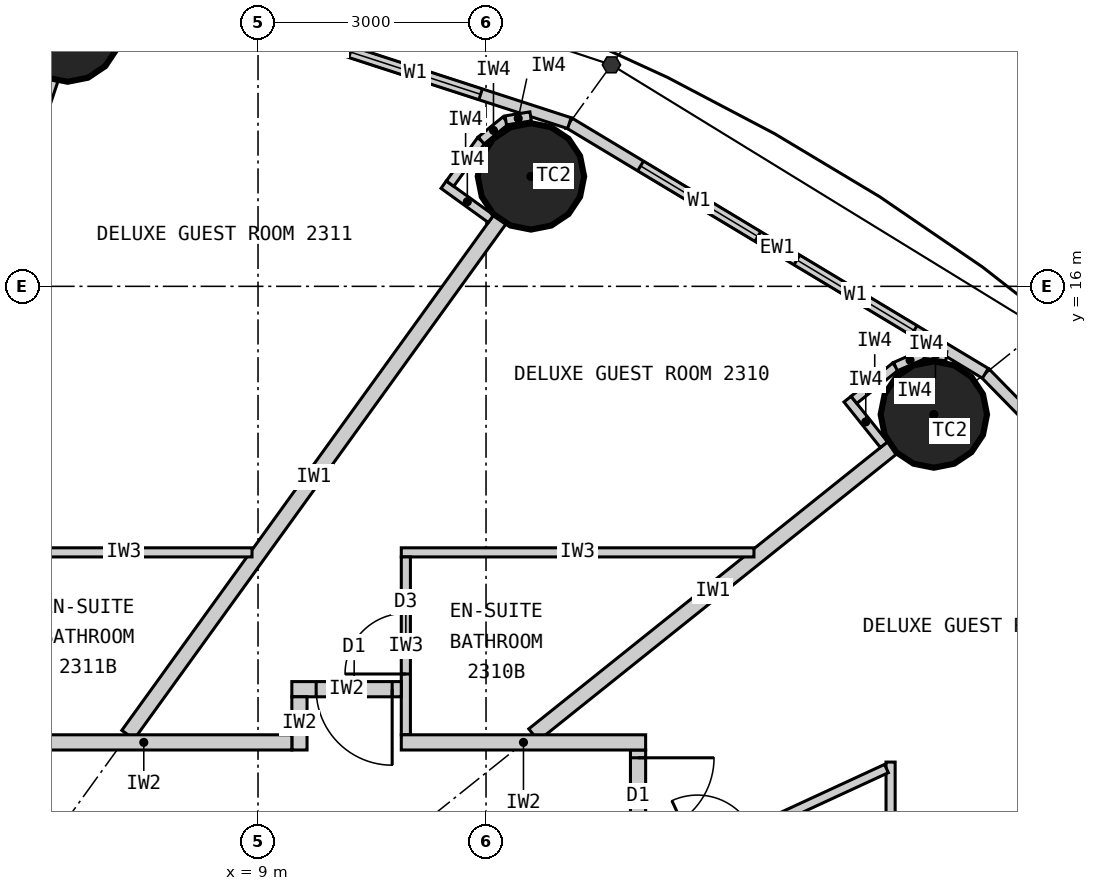
"""IFC4 building model, lengths in metres.
Left out: names, types, materials, properties, quantities, classifications, styles, units other than length and angle.
Written with IfcOpenShell. Run it as: python <this file> out.ifc"""

import sys

from ifc_helpers import new_model, si_unit, direction, frame, frame_2d, origin, origin_2d, place, context, subcontext, project, spatial, rectangle, circle, extrude, clip, halfspace, element, fill, save


model = new_model("IFC4")
c1 = context("Model", 3, precision=1e-05, world=origin(), true_north=direction((0.0, 1.0)))
c2 = subcontext(c1, "Body", "Model", "MODEL_VIEW")
j1 = project(units=[si_unit("LENGTHUNIT", "METRE"), si_unit("PLANEANGLEUNIT", "RADIAN")], contexts=[c1])
p1 = place(None, origin())
s1 = spatial("IfcSite", under=j1, at=p1, CompositionType="ELEMENT")
p2 = place(p1, origin())
s2 = spatial("IfcBuilding", under=s1, at=p2, CompositionType="ELEMENT")
p3 = place(p2, frame((0.0, 0.0, 90.3)))
s3 = spatial("IfcBuildingStorey", under=s2, at=p3, CompositionType="ELEMENT", Elevation=90.3)
for number, where, z_axis, x_axis in (
    (1, (17.892, 14.313, 0.0), (0.0, 0.0, 1.0), (1.0, 0.0, 0.0)),
    (2, (12.591, 17.447, 0.0), (0.0, 0.0, 1.0), (1.0, 0.0, 0.0)),
    (3, (6.495, 19.391, 0.0), (0.0, 0.0, 1.0), (1.0, 0.0, 0.0)),
):
    element("IfcColumn", number, at=place(p3, frame(where, z_axis=z_axis, x_axis=x_axis)), inside=s3, PredefinedType="COLUMN", context=c2, shape_type="Clipping", body=[
        clip(extrude(circle(Radius=0.7, at=origin_2d()), origin(), (0.0, 0.0, 1.0), 3.3), halfspace(frame((0.0, 0.0, 2.25), z_axis=(0.0, 0.0, 1.0), x_axis=(1.0, 0.0, 0.0)), False)),
    ])
p4 = place(p3, frame((22.803, 10.532, 0.0), z_axis=(0.0, 0.0, 1.0), x_axis=(-0.699602905915, 0.714531856557, 0.0)))
e4 = element("IfcWall", 4, at=p4, inside=s3, PredefinedType="ELEMENTEDWALL", context=c2, shape_type="SweptSolid", body=[
    extrude(rectangle(XDim=6.051, YDim=0.15, at=frame_2d((3.025, 0.0))), origin(), (0.0, 0.0, 1.0), 3.05),
])
p5 = place(p4, frame((0.926, 0.0, 0.9)))
e5 = element("IfcOpeningElement", 5, at=p5, cuts=e4, PredefinedType="OPENING", context=c2, shape_type="SweptSolid", body=[
    extrude(rectangle(XDim=1.8, YDim=1.9, at=frame_2d((0.9, 0.95))), frame((0.0, 0.085, 0.0), z_axis=(0.0, -1.0, 0.0), x_axis=(1.0, 0.0, 0.0)), (0.0, 0.0, 1.0), 0.17),
])
p6 = place(p4, frame((3.325, 0.0, 0.9)))
e6 = element("IfcOpeningElement", 6, at=p6, cuts=e4, PredefinedType="OPENING", context=c2, shape_type="SweptSolid", body=[
    extrude(rectangle(XDim=1.8, YDim=1.9, at=frame_2d((0.9, 0.95))), frame((0.0, 0.085, 0.0), z_axis=(0.0, -1.0, 0.0), x_axis=(1.0, 0.0, 0.0)), (0.0, 0.0, 1.0), 0.17),
])
p7 = place(p3, frame((18.57, 14.856, 0.0), z_axis=(0.0, 0.0, 1.0), x_axis=(-0.856983180864, 0.515344377787, 0.0)))
e7 = element("IfcWall", 7, at=p7, inside=s3, PredefinedType="ELEMENTEDWALL", context=c2, shape_type="SweptSolid", body=[
    extrude(rectangle(XDim=6.386, YDim=0.15, at=frame_2d((3.193, 0.0))), origin(), (0.0, 0.0, 1.0), 3.05),
])
p8 = place(p7, frame((1.093, 0.0, 0.9)))
e8 = element("IfcOpeningElement", 8, at=p8, cuts=e7, PredefinedType="OPENING", context=c2, shape_type="SweptSolid", body=[
    extrude(rectangle(XDim=1.8, YDim=1.9, at=frame_2d((0.9, 0.95))), frame((0.0, 0.085, 0.0), z_axis=(0.0, -1.0, 0.0), x_axis=(1.0, 0.0, 0.0)), (0.0, 0.0, 1.0), 0.17),
])
p9 = place(p7, frame((3.493, 0.0, 0.9)))
e9 = element("IfcOpeningElement", 9, at=p9, cuts=e7, PredefinedType="OPENING", context=c2, shape_type="SweptSolid", body=[
    extrude(rectangle(XDim=1.8, YDim=1.9, at=frame_2d((0.9, 0.95))), frame((0.0, 0.085, 0.0), z_axis=(0.0, -1.0, 0.0), x_axis=(1.0, 0.0, 0.0)), (0.0, 0.0, 1.0), 0.17),
])
p10 = place(p3, frame((13.096, 18.147, 0.0), z_axis=(0.0, 0.0, 1.0), x_axis=(-0.951137534625, 0.308767534285, 0.0)))
e10 = element("IfcWall", 10, at=p10, inside=s3, PredefinedType="ELEMENTEDWALL", context=c2, shape_type="SweptSolid", body=[
    extrude(rectangle(XDim=6.655, YDim=0.15, at=frame_2d((3.328, 0.0))), origin(), (0.0, 0.0, 1.0), 3.05),
])
p11 = place(p10, frame((1.228, 0.0, 0.9)))
e11 = element("IfcOpeningElement", 11, at=p11, cuts=e10, PredefinedType="OPENING", context=c2, shape_type="SweptSolid", body=[
    extrude(rectangle(XDim=1.8, YDim=1.9, at=frame_2d((0.9, 0.95))), frame((0.0, 0.085, 0.0), z_axis=(0.0, -1.0, 0.0), x_axis=(1.0, 0.0, 0.0)), (0.0, 0.0, 1.0), 0.17),
])
p12 = place(p10, frame((3.628, 0.0, 0.9)))
e12 = element("IfcOpeningElement", 12, at=p12, cuts=e10, PredefinedType="OPENING", context=c2, shape_type="SweptSolid", body=[
    extrude(rectangle(XDim=1.8, YDim=1.9, at=frame_2d((0.9, 0.95))), frame((0.0, 0.085, 0.0), z_axis=(0.0, -1.0, 0.0), x_axis=(1.0, 0.0, 0.0)), (0.0, 0.0, 1.0), 0.17),
])
p13 = place(p3, frame((14.0, -9.9, 0.0), z_axis=(0.0, 0.0, 1.0), x_axis=(0.0, 1.0, 0.0)))
e13 = element("IfcWall", 13, at=p13, inside=s3, PredefinedType="PARTITIONING", context=c2, shape_type="SweptSolid", body=[
    extrude(rectangle(XDim=19.8, YDim=0.2, at=frame_2d((9.9, 0.0))), origin(), (0.0, 0.0, 1.0), 3.05),
])
p14 = place(p13, frame((0.204, 0.0, 0.0)))
e14 = element("IfcOpeningElement", 14, at=p14, cuts=e13, PredefinedType="OPENING", context=c2, shape_type="SweptSolid", body=[
    extrude(rectangle(XDim=1.0, YDim=2.2, at=frame_2d((0.5, 1.1))), frame((0.0, 0.11, 0.0), z_axis=(0.0, -1.0, 0.0), x_axis=(1.0, 0.0, 0.0)), (0.0, 0.0, 1.0), 0.22),
])
p15 = place(p13, frame((13.715, 0.0, 0.0)))
e15 = element("IfcOpeningElement", 15, at=p15, cuts=e13, PredefinedType="OPENING", context=c2, shape_type="SweptSolid", body=[
    extrude(rectangle(XDim=1.0, YDim=2.2, at=frame_2d((0.5, 1.1))), frame((0.0, 0.11, 0.0), z_axis=(0.0, -1.0, 0.0), x_axis=(1.0, 0.0, 0.0)), (0.0, 0.0, 1.0), 0.22),
])
p16 = place(p13, frame((18.698, 0.0, 0.0)))
e16 = element("IfcOpeningElement", 16, at=p16, cuts=e13, PredefinedType="OPENING", context=c2, shape_type="SweptSolid", body=[
    extrude(rectangle(XDim=1.0, YDim=2.2, at=frame_2d((0.5, 1.1))), frame((0.0, 0.11, 0.0), z_axis=(0.0, -1.0, 0.0), x_axis=(1.0, 0.0, 0.0)), (0.0, 0.0, 1.0), 0.22),
])
p17 = place(p3, frame((14.1, 6.512, 0.0), z_axis=(0.0, 0.0, 1.0), x_axis=(0.907832871056, 0.419332181247, 0.0)))
e17 = element("IfcWall", 17, at=p17, inside=s3, PredefinedType="PARTITIONING", context=c2, shape_type="SweptSolid", body=[
    extrude(rectangle(XDim=8.023, YDim=0.2, at=frame_2d((4.011, 0.0))), origin(), (0.0, 0.0, 1.0), 2.15),
])
p18 = place(p3, frame((12.625, 10.1, 0.0), z_axis=(0.0, 0.0, 1.0), x_axis=(0.780892451574, 0.624665493744, 0.0)))
e18 = element("IfcWall", 18, at=p18, inside=s3, PredefinedType="PARTITIONING", context=c2, shape_type="SweptSolid", body=[
    extrude(rectangle(XDim=6.045, YDim=0.2, at=frame_2d((3.022, 0.0))), origin(), (0.0, 0.0, 1.0), 2.25),
])
p19 = place(p3, frame((7.289, 10.1, 0.0), z_axis=(0.0, 0.0, 1.0), x_axis=(0.585198353053, 0.810890182197, 0.0)))
e19 = element("IfcWall", 19, at=p19, inside=s3, PredefinedType="PARTITIONING", context=c2, shape_type="SweptSolid", body=[
    extrude(rectangle(XDim=8.36, YDim=0.2, at=frame_2d((4.18, 0.0))), origin(), (0.0, 0.0, 1.0), 2.15),
])
p20 = place(p3, frame((3.383, 10.1, 0.0), z_axis=(0.0, 0.0, 1.0), x_axis=(0.31759592231, 0.948226149256, 0.0)))
e20 = element("IfcWall", 20, at=p20, inside=s3, PredefinedType="PARTITIONING", context=c2, shape_type="SweptSolid", body=[
    extrude(rectangle(XDim=9.098, YDim=0.2, at=frame_2d((4.549, 0.0))), origin(), (0.0, 0.0, 1.0), 2.15),
])
p21 = place(p3, frame((17.323, 8.101, 0.0), z_axis=(0.0, 0.0, 1.0), x_axis=(0.0, 1.0, 0.0)))
e21 = element("IfcWall", 21, at=p21, inside=s3, PredefinedType="PARTITIONING", context=c2, shape_type="SweptSolid", body=[
    extrude(rectangle(XDim=1.64, YDim=0.12, at=frame_2d((0.82, 0.0))), origin(), (0.0, 0.0, 1.0), 3.05),
])
p22 = place(p3, frame((14.1, 8.193, 0.0), z_axis=(0.0, 0.0, 1.0), x_axis=(0.907836493557, 0.419324338628, 0.0)))
e22 = element("IfcWall", 22, at=p22, inside=s3, PredefinedType="PARTITIONING", context=c2, shape_type="SweptSolid", body=[
    extrude(rectangle(XDim=3.49, YDim=0.12, at=frame_2d((1.745, 0.0))), origin(), (0.0, 0.0, 1.0), 3.05),
])
p23 = place(p22, frame((0.75, 0.0, 0.0)))
e23 = element("IfcOpeningElement", 23, at=p23, cuts=e22, PredefinedType="OPENING", context=c2, shape_type="SweptSolid", body=[
    extrude(rectangle(XDim=0.8, YDim=2.1, at=frame_2d((0.4, 1.05))), frame((0.0, 0.07, 0.0), z_axis=(0.0, -1.0, 0.0), x_axis=(1.0, 0.0, 0.0)), (0.0, 0.0, 1.0), 0.14),
])
p24 = place(p3, frame((15.525, 12.5, 0.0), z_axis=(0.0, 0.0, 1.0), x_axis=(-1.0, 0.0, 0.0)))
e24 = element("IfcWall", 24, at=p24, inside=s3, PredefinedType="PARTITIONING", context=c2, shape_type="SweptSolid", body=[
    extrude(rectangle(XDim=4.64, YDim=0.12, at=frame_2d((2.32, 0.0))), origin(), (0.0, 0.0, 1.0), 3.05),
])
p25 = place(p3, frame((10.945, 10.1, 0.0), z_axis=(0.0, 0.0, 1.0), x_axis=(0.0, 1.0, 0.0)))
e25 = element("IfcWall", 25, at=p25, inside=s3, PredefinedType="PARTITIONING", context=c2, shape_type="SweptSolid", body=[
    extrude(rectangle(XDim=2.34, YDim=0.12, at=frame_2d((1.17, 0.0))), origin(), (0.0, 0.0, 1.0), 3.05),
])
p26 = place(p25, frame((0.8, 0.0, 0.0)))
e26 = element("IfcOpeningElement", 26, at=p26, cuts=e25, PredefinedType="OPENING", context=c2, shape_type="SweptSolid", body=[
    extrude(rectangle(XDim=0.8, YDim=2.1, at=frame_2d((0.4, 1.05))), frame((0.0, 0.07, 0.0), z_axis=(0.0, -1.0, 0.0), x_axis=(1.0, 0.0, 0.0)), (0.0, 0.0, 1.0), 0.14),
])
p27 = place(p3, frame((8.921, 12.5, 0.0), z_axis=(0.0, 0.0, 1.0), x_axis=(-1.0, 0.0, 0.0)))
e27 = element("IfcWall", 27, at=p27, inside=s3, PredefinedType="PARTITIONING", context=c2, shape_type="SweptSolid", body=[
    extrude(rectangle(XDim=3.372, YDim=0.12, at=frame_2d((1.686, 0.0))), origin(), (0.0, 0.0, 1.0), 3.05),
])
p28 = place(p3, frame((9.445, 10.7, 0.0), z_axis=(0.0, 0.0, 1.0), x_axis=(1.0, 0.0, 0.0)))
e28 = element("IfcWall", 28, at=p28, inside=s3, PredefinedType="PARTITIONING", context=c2, shape_type="SweptSolid", body=[
    extrude(rectangle(XDim=1.44, YDim=0.2, at=frame_2d((0.72, 0.0))), origin(), (0.0, 0.0, 1.0), 3.05),
])
p29 = place(p28, frame((0.32, 0.0, 0.0)))
e29 = element("IfcOpeningElement", 29, at=p29, cuts=e28, PredefinedType="OPENING", context=c2, shape_type="SweptSolid", body=[
    extrude(rectangle(XDim=1.0, YDim=2.2, at=frame_2d((0.5, 1.1))), frame((0.0, 0.11, 0.0), z_axis=(0.0, -1.0, 0.0), x_axis=(1.0, 0.0, 0.0)), (0.0, 0.0, 1.0), 0.22),
])
p30 = place(p3, frame((9.545, 9.9, 0.0), z_axis=(0.0, 0.0, 1.0), x_axis=(0.0, 1.0, 0.0)))
e30 = element("IfcWall", 30, at=p30, inside=s3, PredefinedType="PARTITIONING", context=c2, shape_type="SweptSolid", body=[
    extrude(rectangle(XDim=0.7, YDim=0.2, at=frame_2d((0.35, 0.0))), origin(), (0.0, 0.0, 1.0), 3.05),
])
p31 = place(p3, frame((5.549, 10.0, 0.0), z_axis=(0.0, 0.0, 1.0), x_axis=(1.0, 0.0, 0.0)))
e31 = element("IfcWall", 31, at=p31, inside=s3, PredefinedType="PARTITIONING", context=c2, shape_type="SweptSolid", body=[
    extrude(rectangle(XDim=3.896, YDim=0.2, at=frame_2d((1.948, 0.0))), origin(), (0.0, 0.0, 1.0), 3.05),
])
p32 = place(p3, frame((10.885, 10.0, 0.0), z_axis=(0.0, 0.0, 1.0), x_axis=(1.0, 0.0, 0.0)))
e32 = element("IfcWall", 32, at=p32, inside=s3, PredefinedType="PARTITIONING", context=c2, shape_type="SweptSolid", body=[
    extrude(rectangle(XDim=3.215, YDim=0.2, at=frame_2d((1.607, 0.0))), origin(), (0.0, 0.0, 1.0), 3.05),
])
p33 = place(p3, frame((17.236, 13.917, 0.0), z_axis=(0.0, 0.0, 1.0), x_axis=(-0.624695047554, 0.780868809443, 0.0)))
e33 = element("IfcWall", 33, at=p33, inside=s3, PredefinedType="PARTITIONING", context=c2, shape_type="SweptSolid", body=[
    extrude(rectangle(XDim=0.768, YDim=0.12, at=frame_2d((0.384, 0.0))), origin(), (0.0, 0.0, 1.0), 3.05),
])
p34 = place(p3, frame((16.841, 14.507, 0.0), z_axis=(0.0, 0.0, 1.0), x_axis=(0.780902834923, 0.62465251333, 0.0)))
e34 = element("IfcWall", 34, at=p34, inside=s3, PredefinedType="PARTITIONING", context=c2, shape_type="SweptSolid", body=[
    extrude(rectangle(XDim=0.7, YDim=0.12, at=frame_2d((0.35, 0.0))), origin(), (0.0, 0.0, 1.0), 3.05),
])
p35 = place(p3, frame((17.387, 14.944, 0.0), z_axis=(0.0, 0.0, 1.0), x_axis=(0.916036698064, 0.401094462441, 0.0)))
e35 = element("IfcWall", 35, at=p35, inside=s3, PredefinedType="PARTITIONING", context=c2, shape_type="SweptSolid", body=[
    extrude(rectangle(XDim=0.418, YDim=0.12, at=frame_2d((0.209, 0.0))), origin(), (0.0, 0.0, 1.0), 3.05),
])
p36 = place(p3, frame((17.77, 15.112, 0.0), z_axis=(0.0, 0.0, 1.0), x_axis=(0.993904401174, -0.110245368731, 0.0)))
e36 = element("IfcWall", 36, at=p36, inside=s3, PredefinedType="PARTITIONING", context=c2, shape_type="SweptSolid", body=[
    extrude(rectangle(XDim=0.288, YDim=0.12, at=frame_2d((0.144, 0.0))), origin(), (0.0, 0.0, 1.0), 3.05),
])
p37 = place(p3, frame((12.065, 16.889, 0.0), z_axis=(0.0, 0.0, 1.0), x_axis=(-0.810821798253, 0.585293098778, 0.0)))
e37 = element("IfcWall", 37, at=p37, inside=s3, PredefinedType="PARTITIONING", context=c2, shape_type="SweptSolid", body=[
    extrude(rectangle(XDim=0.768, YDim=0.12, at=frame_2d((0.384, 0.0))), origin(), (0.0, 0.0, 1.0), 3.05),
])
p38 = place(p3, frame((11.526, 17.351, 0.0), z_axis=(0.0, 0.0, 1.0), x_axis=(0.585223113993, 0.810872312296, 0.0)))
e38 = element("IfcWall", 38, at=p38, inside=s3, PredefinedType="PARTITIONING", context=c2, shape_type="SweptSolid", body=[
    extrude(rectangle(XDim=0.7, YDim=0.12, at=frame_2d((0.35, 0.0))), origin(), (0.0, 0.0, 1.0), 3.05),
])
p39 = place(p3, frame((11.936, 17.919, 0.0), z_axis=(0.0, 0.0, 1.0), x_axis=(0.775023088441, 0.631932917629, 0.0)))
e39 = element("IfcWall", 39, at=p39, inside=s3, PredefinedType="PARTITIONING", context=c2, shape_type="SweptSolid", body=[
    extrude(rectangle(XDim=0.418, YDim=0.12, at=frame_2d((0.209, 0.0))), origin(), (0.0, 0.0, 1.0), 3.05),
])
p40 = place(p3, frame((12.26, 18.183, 0.0), z_axis=(0.0, 0.0, 1.0), x_axis=(0.987218661664, 0.159371622511, 0.0)))
e40 = element("IfcWall", 40, at=p40, inside=s3, PredefinedType="PARTITIONING", context=c2, shape_type="SweptSolid", body=[
    extrude(rectangle(XDim=0.331, YDim=0.12, at=frame_2d((0.166, 0.0))), origin(), (0.0, 0.0, 1.0), 3.05),
])
p41 = place(p8, origin())
e41 = element("IfcWindow", 41, at=p41, inside=s3, PartitioningType="SINGLE_PANEL", PredefinedType="WINDOW", context=c2, shape_type="SweptSolid", body=[
    extrude(rectangle(XDim=1.8, YDim=1.9, at=frame_2d((0.9, 0.95))), frame((0.0, 0.03, 0.0), z_axis=(0.0, -1.0, 0.0), x_axis=(1.0, 0.0, 0.0)), (0.0, 0.0, 1.0), 0.06),
])
fill(e8, e41)
p42 = place(p9, origin())
e42 = element("IfcWindow", 42, at=p42, inside=s3, PartitioningType="SINGLE_PANEL", PredefinedType="WINDOW", context=c2, shape_type="SweptSolid", body=[
    extrude(rectangle(XDim=1.8, YDim=1.9, at=frame_2d((0.9, 0.95))), frame((0.0, 0.03, 0.0), z_axis=(0.0, -1.0, 0.0), x_axis=(1.0, 0.0, 0.0)), (0.0, 0.0, 1.0), 0.06),
])
fill(e9, e42)
p43 = place(p11, origin())
e43 = element("IfcWindow", 43, at=p43, inside=s3, PartitioningType="SINGLE_PANEL", PredefinedType="WINDOW", context=c2, shape_type="SweptSolid", body=[
    extrude(rectangle(XDim=1.8, YDim=1.9, at=frame_2d((0.9, 0.95))), frame((0.0, 0.03, 0.0), z_axis=(0.0, -1.0, 0.0), x_axis=(1.0, 0.0, 0.0)), (0.0, 0.0, 1.0), 0.06),
])
fill(e11, e43)
p44 = place(p16, origin())
e44 = element("IfcDoor", 44, at=p44, inside=s3, OperationType="SINGLE_SWING_RIGHT", PredefinedType="DOOR", context=c2, shape_type="SweptSolid", body=[
    extrude(rectangle(XDim=1.0, YDim=2.2, at=frame_2d((0.5, 1.1))), frame((0.0, 0.025, 0.0), z_axis=(0.0, -1.0, 0.0), x_axis=(1.0, 0.0, 0.0)), (0.0, 0.0, 1.0), 0.05),
])
fill(e16, e44)
p45 = place(p26, origin())
e45 = element("IfcDoor", 45, at=p45, inside=s3, OperationType="SINGLE_SWING_LEFT", PredefinedType="DOOR", context=c2, shape_type="SweptSolid", body=[
    extrude(rectangle(XDim=0.8, YDim=2.1, at=frame_2d((0.4, 1.05))), frame((0.0, 0.025, 0.0), z_axis=(0.0, -1.0, 0.0), x_axis=(1.0, 0.0, 0.0)), (0.0, 0.0, 1.0), 0.05),
])
fill(e26, e45)
p46 = place(p29, origin())
e46 = element("IfcDoor", 46, at=p46, inside=s3, OperationType="SINGLE_SWING_RIGHT", PredefinedType="DOOR", context=c2, shape_type="SweptSolid", body=[
    extrude(rectangle(XDim=1.0, YDim=2.2, at=frame_2d((0.5, 1.1))), frame((0.0, 0.025, 0.0), z_axis=(0.0, -1.0, 0.0), x_axis=(1.0, 0.0, 0.0)), (0.0, 0.0, 1.0), 0.05),
])
fill(e29, e46)
save(model, sys.argv[1])
